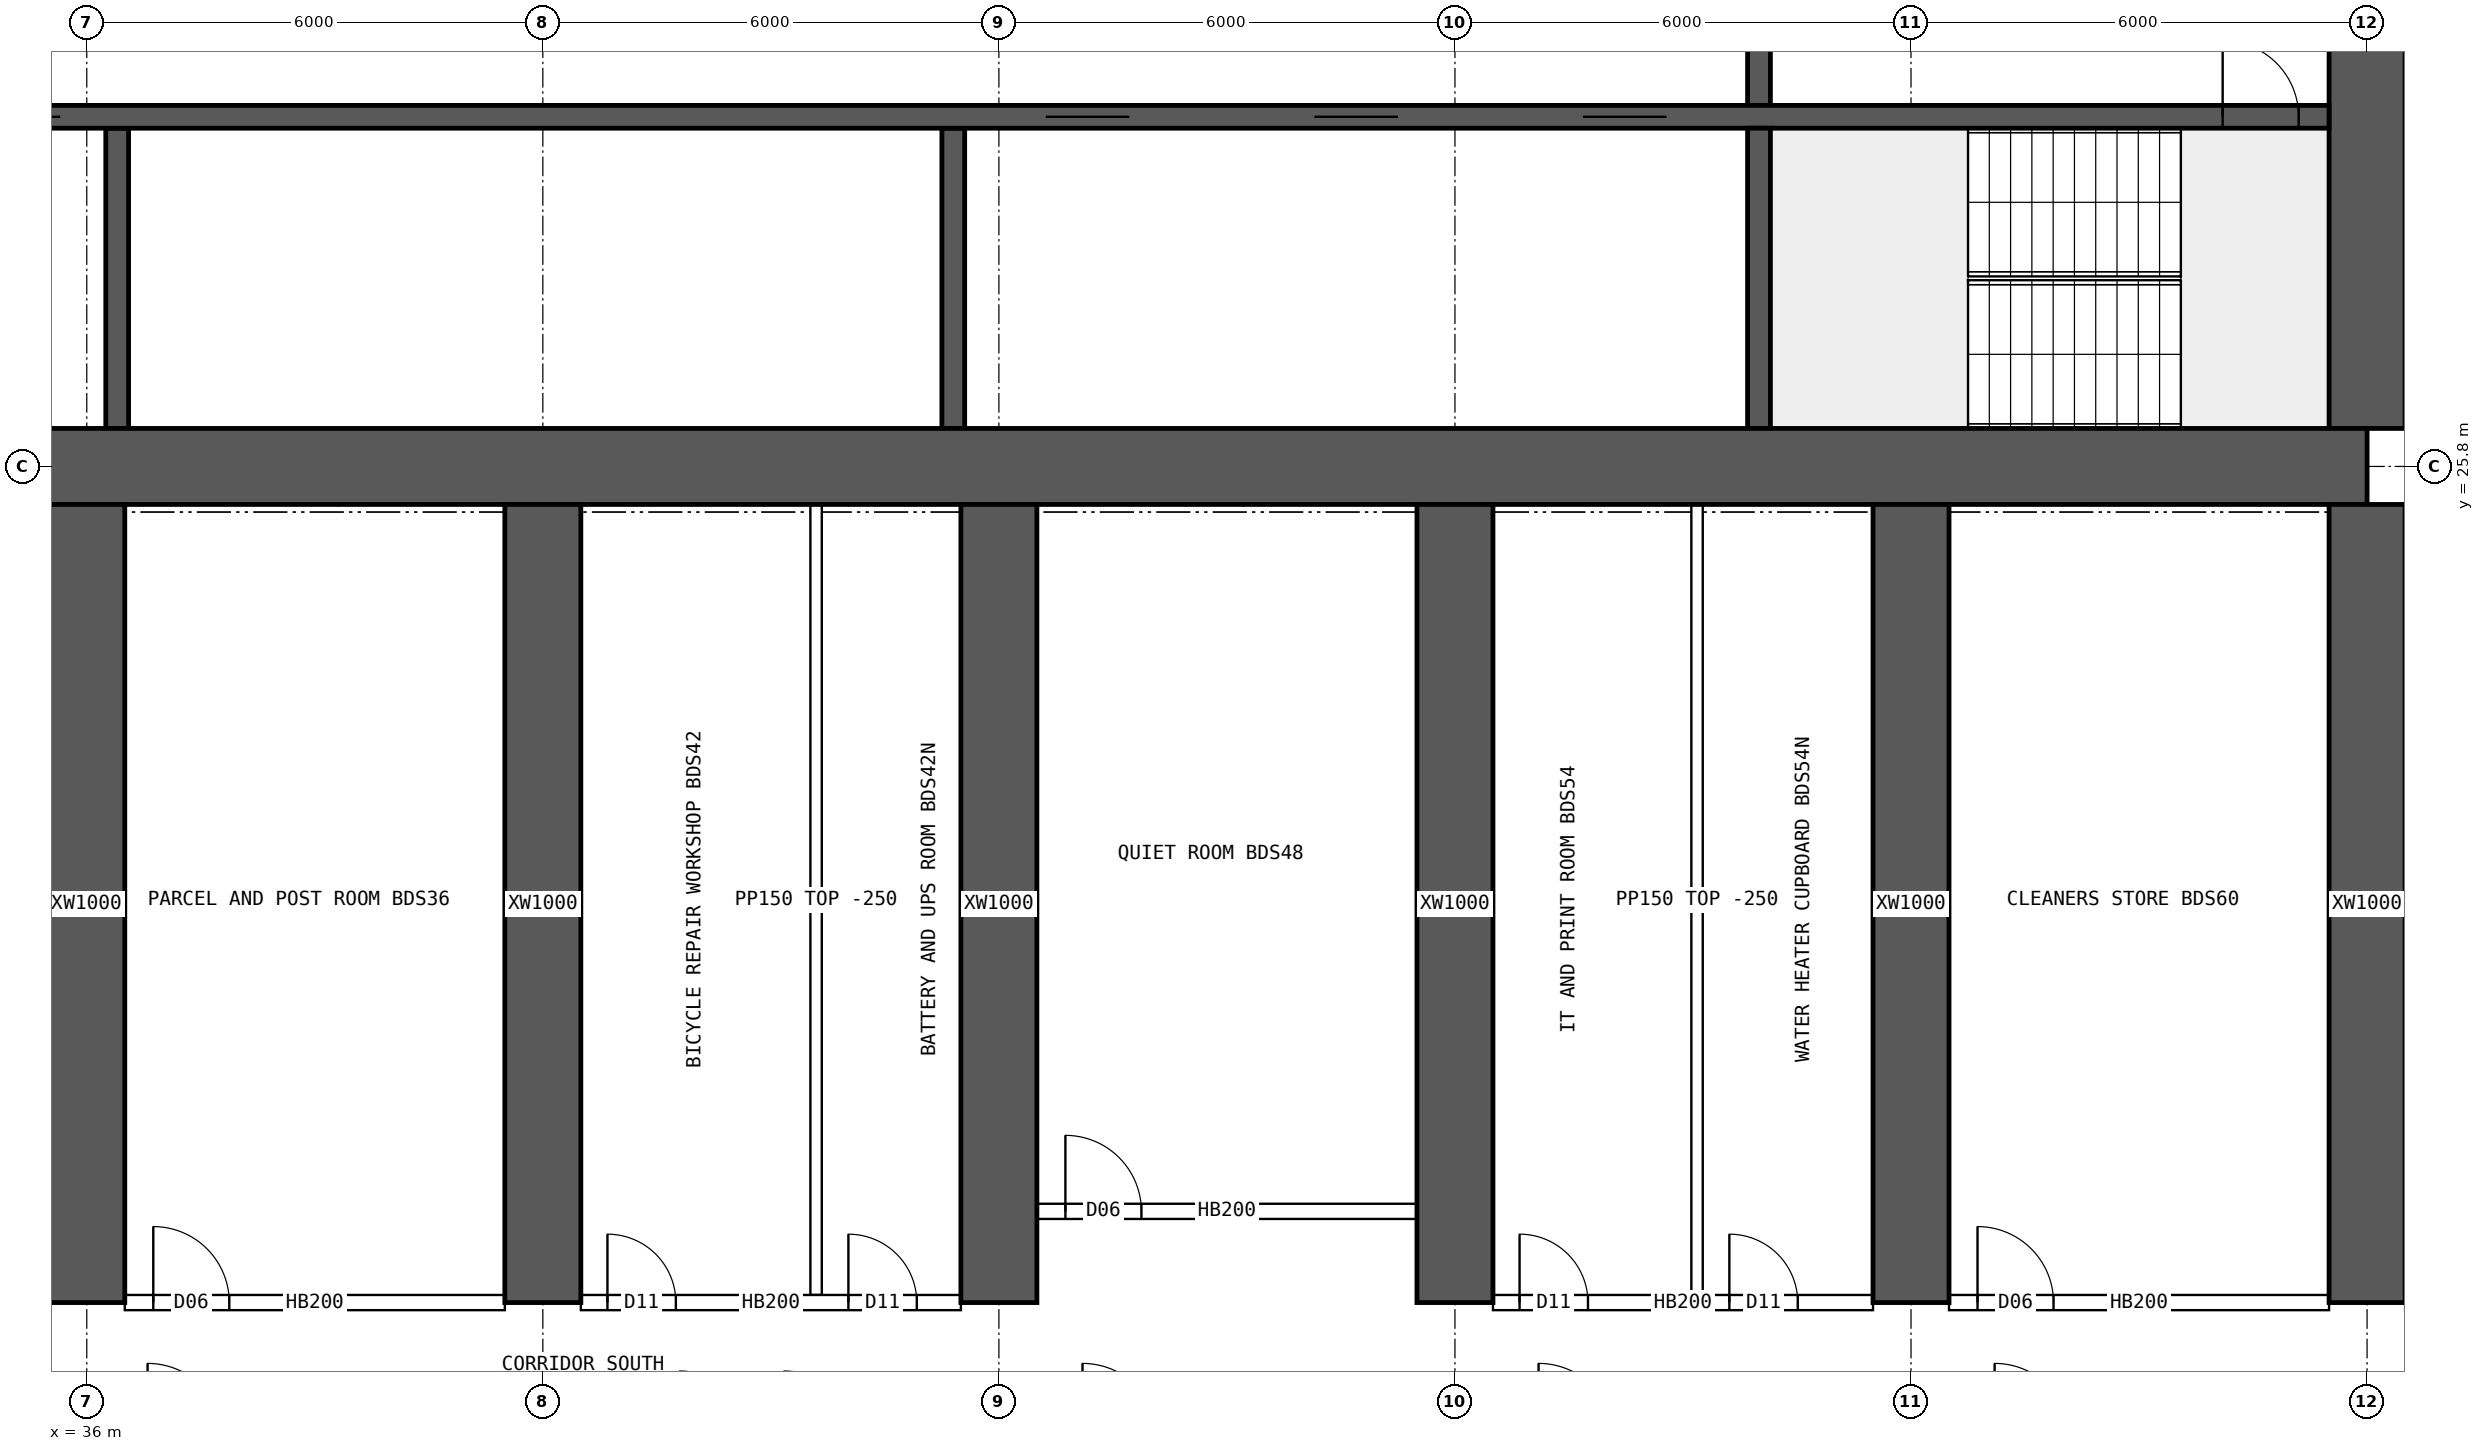
"""IFC4 building model, lengths in metres.
Left out: names, types, materials, properties, quantities, classifications, styles, units other than length and angle.
Written with IfcOpenShell. Run it as: python <this file> out.ifc"""

import sys

from ifc_helpers import new_model, si_unit, direction, frame, frame_2d, origin, place, context, subcontext, project, spatial, rectangle, extrude, element, fill, save


model = new_model("IFC4")
c1 = context("Model", 3, precision=1e-05, world=origin(), true_north=direction((0.0, 1.0)))
c2 = subcontext(c1, "Body", "Model", "MODEL_VIEW")
j1 = project(units=[si_unit("LENGTHUNIT", "METRE"), si_unit("PLANEANGLEUNIT", "RADIAN")], contexts=[c1])
p1 = place(None, origin())
s1 = spatial("IfcSite", under=j1, at=p1, CompositionType="ELEMENT")
p2 = place(p1, origin())
s2 = spatial("IfcBuilding", under=s1, at=p2, CompositionType="ELEMENT")
p3 = place(p2, frame((0.0, 0.0, 61.45)))
s3 = spatial("IfcBuildingStorey", under=s2, at=p3, CompositionType="ELEMENT", Elevation=61.45)
p4 = place(p3, frame((18.0, 25.8, 0.0), z_axis=(0.0, 0.0, 1.0), x_axis=(1.0, 0.0, 0.0)))
e1 = element("IfcWall", 1, at=p4, inside=s3, PredefinedType="SHEAR", context=c2, shape_type="SweptSolid", body=[
    extrude(rectangle(XDim=48.0, YDim=1.0, at=frame_2d((24.0, 0.0))), origin(), (0.0, 0.0, 1.0), 3.75),
])
p5 = place(p3, frame((66.0, 26.3, 0.0), z_axis=(0.0, 0.0, 1.0), x_axis=(0.0, 1.0, 0.0)))
e2 = element("IfcWall", 2, at=p5, inside=s3, PredefinedType="SHEAR", context=c2, shape_type="SweptSolid", body=[
    extrude(rectangle(XDim=11.4, YDim=1.0, at=frame_2d((5.7, 0.0))), origin(), (0.0, 0.0, 1.0), 3.75),
])
p6 = place(p5, frame((5.0, 0.0, 0.0)))
e3 = element("IfcOpeningElement", 3, at=p6, cuts=e2, PredefinedType="OPENING", context=c2, shape_type="SweptSolid", body=[
    extrude(rectangle(XDim=1.2, YDim=2.1, at=frame_2d((0.6, 1.05))), frame((0.0, 0.51, 0.0), z_axis=(0.0, -1.0, 0.0), x_axis=(1.0, 0.0, 0.0)), (0.0, 0.0, 1.0), 1.02),
])
p7 = place(p3, frame((18.5, 30.4, 0.0), z_axis=(0.0, 0.0, 1.0), x_axis=(1.0, 0.0, 0.0)))
e4 = element("IfcWall", 4, at=p7, inside=s3, PredefinedType="SHEAR", context=c2, shape_type="SweptSolid", body=[
    extrude(rectangle(XDim=47.0, YDim=0.3, at=frame_2d((23.5, 0.0))), origin(), (0.0, 0.0, 1.0), 3.75),
])
p8 = place(p7, frame((0.4, 0.0, 0.0)))
e5 = element("IfcOpeningElement", 5, at=p8, cuts=e4, PredefinedType="OPENING", context=c2, shape_type="SweptSolid", body=[
    extrude(rectangle(XDim=1.0, YDim=2.1, at=frame_2d((0.5, 1.05))), frame((0.0, 0.16, 0.0), z_axis=(0.0, -1.0, 0.0), x_axis=(1.0, 0.0, 0.0)), (0.0, 0.0, 1.0), 0.32),
])
p9 = place(p7, frame((45.6, 0.0, 0.0)))
e6 = element("IfcOpeningElement", 6, at=p9, cuts=e4, PredefinedType="OPENING", context=c2, shape_type="SweptSolid", body=[
    extrude(rectangle(XDim=1.0, YDim=2.1, at=frame_2d((0.5, 1.05))), frame((0.0, 0.16, 0.0), z_axis=(0.0, -1.0, 0.0), x_axis=(1.0, 0.0, 0.0)), (0.0, 0.0, 1.0), 0.32),
])
p10 = place(p7, frame((8.25, 0.0, 0.0)))
e7 = element("IfcOpeningElement", 7, at=p10, cuts=e4, PredefinedType="OPENING", context=c2, shape_type="SweptSolid", body=[
    extrude(rectangle(XDim=1.1, YDim=2.1, at=frame_2d((0.55, 1.05))), frame((0.0, 0.16, 0.0), z_axis=(0.0, -1.0, 0.0), x_axis=(1.0, 0.0, 0.0)), (0.0, 0.0, 1.0), 0.32),
])
p11 = place(p7, frame((10.85, 0.0, 0.0)))
e8 = element("IfcOpeningElement", 8, at=p11, cuts=e4, PredefinedType="OPENING", context=c2, shape_type="SweptSolid", body=[
    extrude(rectangle(XDim=1.1, YDim=2.1, at=frame_2d((0.55, 1.05))), frame((0.0, 0.16, 0.0), z_axis=(0.0, -1.0, 0.0), x_axis=(1.0, 0.0, 0.0)), (0.0, 0.0, 1.0), 0.32),
])
p12 = place(p7, frame((13.45, 0.0, 0.0)))
e9 = element("IfcOpeningElement", 9, at=p12, cuts=e4, PredefinedType="OPENING", context=c2, shape_type="SweptSolid", body=[
    extrude(rectangle(XDim=1.1, YDim=2.1, at=frame_2d((0.55, 1.05))), frame((0.0, 0.16, 0.0), z_axis=(0.0, -1.0, 0.0), x_axis=(1.0, 0.0, 0.0)), (0.0, 0.0, 1.0), 0.32),
])
p13 = place(p7, frame((16.05, 0.0, 0.0)))
e10 = element("IfcOpeningElement", 10, at=p13, cuts=e4, PredefinedType="OPENING", context=c2, shape_type="SweptSolid", body=[
    extrude(rectangle(XDim=1.1, YDim=2.1, at=frame_2d((0.55, 1.05))), frame((0.0, 0.16, 0.0), z_axis=(0.0, -1.0, 0.0), x_axis=(1.0, 0.0, 0.0)), (0.0, 0.0, 1.0), 0.32),
])
p14 = place(p7, frame((30.117, 0.0, 0.0)))
e11 = element("IfcOpeningElement", 11, at=p14, cuts=e4, PredefinedType="OPENING", context=c2, shape_type="SweptSolid", body=[
    extrude(rectangle(XDim=1.1, YDim=2.1, at=frame_2d((0.55, 1.05))), frame((0.0, 0.16, 0.0), z_axis=(0.0, -1.0, 0.0), x_axis=(1.0, 0.0, 0.0)), (0.0, 0.0, 1.0), 0.32),
])
p15 = place(p7, frame((33.65, 0.0, 0.0)))
e12 = element("IfcOpeningElement", 12, at=p15, cuts=e4, PredefinedType="OPENING", context=c2, shape_type="SweptSolid", body=[
    extrude(rectangle(XDim=1.1, YDim=2.1, at=frame_2d((0.55, 1.05))), frame((0.0, 0.16, 0.0), z_axis=(0.0, -1.0, 0.0), x_axis=(1.0, 0.0, 0.0)), (0.0, 0.0, 1.0), 0.32),
])
p16 = place(p7, frame((37.183, 0.0, 0.0)))
e13 = element("IfcOpeningElement", 13, at=p16, cuts=e4, PredefinedType="OPENING", context=c2, shape_type="SweptSolid", body=[
    extrude(rectangle(XDim=1.1, YDim=2.1, at=frame_2d((0.55, 1.05))), frame((0.0, 0.16, 0.0), z_axis=(0.0, -1.0, 0.0), x_axis=(1.0, 0.0, 0.0)), (0.0, 0.0, 1.0), 0.32),
])
p17 = place(p3, frame((58.0, 26.3, 0.0), z_axis=(0.0, 0.0, 1.0), x_axis=(0.0, 1.0, 0.0)))
e14 = element("IfcWall", 14, at=p17, inside=s3, PredefinedType="SHEAR", context=c2, shape_type="SweptSolid", body=[
    extrude(rectangle(XDim=3.95, YDim=0.3, at=frame_2d((1.975, 0.0))), origin(), (0.0, 0.0, 1.0), 3.75),
])
p18 = place(p3, frame((58.0, 30.55, 0.0), z_axis=(0.0, 0.0, 1.0), x_axis=(0.0, 1.0, 0.0)))
e15 = element("IfcWall", 15, at=p18, inside=s3, PredefinedType="SHEAR", context=c2, shape_type="SweptSolid", body=[
    extrude(rectangle(XDim=3.9, YDim=0.3, at=frame_2d((1.95, 0.0))), origin(), (0.0, 0.0, 1.0), 3.75),
])
p19 = place(p18, frame((1.4, 0.0, 0.0)))
e16 = element("IfcOpeningElement", 16, at=p19, cuts=e15, PredefinedType="OPENING", context=c2, shape_type="SweptSolid", body=[
    extrude(rectangle(XDim=1.2, YDim=2.1, at=frame_2d((0.6, 1.05))), frame((0.0, 0.16, 0.0), z_axis=(0.0, -1.0, 0.0), x_axis=(1.0, 0.0, 0.0)), (0.0, 0.0, 1.0), 0.32),
])
for number, where, z_axis, x_axis in (
    (17, (36.4, 26.3, 0.0), (0.0, 0.0, 1.0), (0.0, 1.0, 0.0)),
    (18, (47.4, 26.3, 0.0), (0.0, 0.0, 1.0), (0.0, 1.0, 0.0)),
):
    element("IfcWall", number, at=place(p3, frame(where, z_axis=z_axis, x_axis=x_axis)), inside=s3, PredefinedType="SHEAR", context=c2, shape_type="SweptSolid", body=[
        extrude(rectangle(XDim=3.95, YDim=0.3, at=frame_2d((1.975, 0.0))), origin(), (0.0, 0.0, 1.0), 3.75),
    ])
for number, where, z_axis, x_axis in (
    (19, (36.0, 14.8, 0.0), (0.0, 0.0, 1.0), (0.0, 1.0, 0.0)),
    (20, (42.0, 14.8, 0.0), (0.0, 0.0, 1.0), (0.0, 1.0, 0.0)),
    (21, (48.0, 14.8, 0.0), (0.0, 0.0, 1.0), (0.0, 1.0, 0.0)),
    (22, (54.0, 14.8, 0.0), (0.0, 0.0, 1.0), (0.0, 1.0, 0.0)),
    (23, (60.0, 14.8, 0.0), (0.0, 0.0, 1.0), (0.0, 1.0, 0.0)),
    (24, (66.0, 14.8, 0.0), (0.0, 0.0, 1.0), (0.0, 1.0, 0.0)),
):
    element("IfcWall", number, at=place(p3, frame(where, z_axis=z_axis, x_axis=x_axis)), inside=s3, PredefinedType="SHEAR", context=c2, shape_type="SweptSolid", body=[
        extrude(rectangle(XDim=10.5, YDim=1.0, at=frame_2d((5.25, 0.0))), origin(), (0.0, 0.0, 1.0), 3.75),
    ])
p20 = place(p3, frame((36.5, 14.8, 0.0), z_axis=(0.0, 0.0, 1.0), x_axis=(1.0, 0.0, 0.0)))
e25 = element("IfcWall", 25, at=p20, inside=s3, PredefinedType="SOLIDWALL", context=c2, shape_type="SweptSolid", body=[
    extrude(rectangle(XDim=5.0, YDim=0.2, at=frame_2d((2.5, 0.0))), origin(), (0.0, 0.0, 1.0), 3.5),
])
p21 = place(p20, frame((0.375, 0.0, 0.0)))
e26 = element("IfcOpeningElement", 26, at=p21, cuts=e25, PredefinedType="OPENING", context=c2, shape_type="SweptSolid", body=[
    extrude(rectangle(XDim=1.0, YDim=2.1, at=frame_2d((0.5, 1.05))), frame((0.0, 0.11, 0.0), z_axis=(0.0, -1.0, 0.0), x_axis=(1.0, 0.0, 0.0)), (0.0, 0.0, 1.0), 0.22),
])
p22 = place(p3, frame((42.5, 14.8, 0.0), z_axis=(0.0, 0.0, 1.0), x_axis=(1.0, 0.0, 0.0)))
e27 = element("IfcWall", 27, at=p22, inside=s3, PredefinedType="SOLIDWALL", context=c2, shape_type="SweptSolid", body=[
    extrude(rectangle(XDim=5.0, YDim=0.2, at=frame_2d((2.5, 0.0))), origin(), (0.0, 0.0, 1.0), 3.5),
])
p23 = place(p22, frame((0.35, 0.0, 0.0)))
e28 = element("IfcOpeningElement", 28, at=p23, cuts=e27, PredefinedType="OPENING", context=c2, shape_type="SweptSolid", body=[
    extrude(rectangle(XDim=0.9, YDim=2.1, at=frame_2d((0.45, 1.05))), frame((0.0, 0.11, 0.0), z_axis=(0.0, -1.0, 0.0), x_axis=(1.0, 0.0, 0.0)), (0.0, 0.0, 1.0), 0.22),
])
p24 = place(p22, frame((3.52, 0.0, 0.0)))
e29 = element("IfcOpeningElement", 29, at=p24, cuts=e27, PredefinedType="OPENING", context=c2, shape_type="SweptSolid", body=[
    extrude(rectangle(XDim=0.9, YDim=2.1, at=frame_2d((0.45, 1.05))), frame((0.0, 0.11, 0.0), z_axis=(0.0, -1.0, 0.0), x_axis=(1.0, 0.0, 0.0)), (0.0, 0.0, 1.0), 0.22),
])
p25 = place(p3, frame((54.5, 14.8, 0.0), z_axis=(0.0, 0.0, 1.0), x_axis=(1.0, 0.0, 0.0)))
e30 = element("IfcWall", 30, at=p25, inside=s3, PredefinedType="SOLIDWALL", context=c2, shape_type="SweptSolid", body=[
    extrude(rectangle(XDim=5.0, YDim=0.2, at=frame_2d((2.5, 0.0))), origin(), (0.0, 0.0, 1.0), 3.5),
])
p26 = place(p25, frame((0.35, 0.0, 0.0)))
e31 = element("IfcOpeningElement", 31, at=p26, cuts=e30, PredefinedType="OPENING", context=c2, shape_type="SweptSolid", body=[
    extrude(rectangle(XDim=0.9, YDim=2.1, at=frame_2d((0.45, 1.05))), frame((0.0, 0.11, 0.0), z_axis=(0.0, -1.0, 0.0), x_axis=(1.0, 0.0, 0.0)), (0.0, 0.0, 1.0), 0.22),
])
p27 = place(p25, frame((3.11, 0.0, 0.0)))
e32 = element("IfcOpeningElement", 32, at=p27, cuts=e30, PredefinedType="OPENING", context=c2, shape_type="SweptSolid", body=[
    extrude(rectangle(XDim=0.9, YDim=2.1, at=frame_2d((0.45, 1.05))), frame((0.0, 0.11, 0.0), z_axis=(0.0, -1.0, 0.0), x_axis=(1.0, 0.0, 0.0)), (0.0, 0.0, 1.0), 0.22),
])
p28 = place(p3, frame((60.5, 14.8, 0.0), z_axis=(0.0, 0.0, 1.0), x_axis=(1.0, 0.0, 0.0)))
e33 = element("IfcWall", 33, at=p28, inside=s3, PredefinedType="SOLIDWALL", context=c2, shape_type="SweptSolid", body=[
    extrude(rectangle(XDim=5.0, YDim=0.2, at=frame_2d((2.5, 0.0))), origin(), (0.0, 0.0, 1.0), 3.5),
])
p29 = place(p28, frame((0.375, 0.0, 0.0)))
e34 = element("IfcOpeningElement", 34, at=p29, cuts=e33, PredefinedType="OPENING", context=c2, shape_type="SweptSolid", body=[
    extrude(rectangle(XDim=1.0, YDim=2.1, at=frame_2d((0.5, 1.05))), frame((0.0, 0.11, 0.0), z_axis=(0.0, -1.0, 0.0), x_axis=(1.0, 0.0, 0.0)), (0.0, 0.0, 1.0), 0.22),
])
p30 = place(p3, frame((45.595, 14.9, 0.0), z_axis=(0.0, 0.0, 1.0), x_axis=(0.0, 1.0, 0.0)))
e35 = element("IfcWall", 35, at=p30, inside=s3, PredefinedType="PARTITIONING", context=c2, shape_type="SweptSolid", body=[
    extrude(rectangle(XDim=10.4, YDim=0.15, at=frame_2d((5.2, 0.0))), origin(), (0.0, 0.0, 1.0), 3.5),
])
p31 = place(p3, frame((48.5, 16.0, 0.0), z_axis=(0.0, 0.0, 1.0), x_axis=(1.0, 0.0, 0.0)))
e36 = element("IfcWall", 36, at=p31, inside=s3, PredefinedType="SOLIDWALL", context=c2, shape_type="SweptSolid", body=[
    extrude(rectangle(XDim=5.0, YDim=0.2, at=frame_2d((2.5, 0.0))), origin(), (0.0, 0.0, 1.0), 3.5),
])
p32 = place(p31, frame((0.375, 0.0, 0.0)))
e37 = element("IfcOpeningElement", 37, at=p32, cuts=e36, PredefinedType="OPENING", context=c2, shape_type="SweptSolid", body=[
    extrude(rectangle(XDim=1.0, YDim=2.1, at=frame_2d((0.5, 1.05))), frame((0.0, 0.11, 0.0), z_axis=(0.0, -1.0, 0.0), x_axis=(1.0, 0.0, 0.0)), (0.0, 0.0, 1.0), 0.22),
])
p33 = place(p3, frame((57.185, 14.9, 0.0), z_axis=(0.0, 0.0, 1.0), x_axis=(0.0, 1.0, 0.0)))
e38 = element("IfcWall", 38, at=p33, inside=s3, PredefinedType="PARTITIONING", context=c2, shape_type="SweptSolid", body=[
    extrude(rectangle(XDim=10.4, YDim=0.15, at=frame_2d((5.2, 0.0))), origin(), (0.0, 0.0, 1.0), 3.5),
])
p34 = place(p9, origin())
e39 = element("IfcDoor", 39, at=p34, inside=s3, OperationType="SINGLE_SWING_LEFT", PredefinedType="DOOR", context=c2, shape_type="SweptSolid", body=[
    extrude(rectangle(XDim=1.0, YDim=2.1, at=frame_2d((0.5, 1.05))), frame((0.0, 0.025, 0.0), z_axis=(0.0, -1.0, 0.0), x_axis=(1.0, 0.0, 0.0)), (0.0, 0.0, 1.0), 0.05),
])
fill(e6, e39)
p35 = place(p13, origin())
e40 = element("IfcDoor", 40, at=p35, inside=s3, OperationType="DOUBLE_DOOR_SLIDING", PredefinedType="DOOR", context=c2, shape_type="SweptSolid", body=[
    extrude(rectangle(XDim=1.1, YDim=2.1, at=frame_2d((0.55, 1.05))), frame((0.0, 0.025, 0.0), z_axis=(0.0, -1.0, 0.0), x_axis=(1.0, 0.0, 0.0)), (0.0, 0.0, 1.0), 0.05),
])
fill(e10, e40)
p36 = place(p14, origin())
e41 = element("IfcDoor", 41, at=p36, inside=s3, OperationType="DOUBLE_DOOR_SLIDING", PredefinedType="DOOR", context=c2, shape_type="SweptSolid", body=[
    extrude(rectangle(XDim=1.1, YDim=2.1, at=frame_2d((0.55, 1.05))), frame((0.0, 0.025, 0.0), z_axis=(0.0, -1.0, 0.0), x_axis=(1.0, 0.0, 0.0)), (0.0, 0.0, 1.0), 0.05),
])
fill(e11, e41)
p37 = place(p15, origin())
e42 = element("IfcDoor", 42, at=p37, inside=s3, OperationType="DOUBLE_DOOR_SLIDING", PredefinedType="DOOR", context=c2, shape_type="SweptSolid", body=[
    extrude(rectangle(XDim=1.1, YDim=2.1, at=frame_2d((0.55, 1.05))), frame((0.0, 0.025, 0.0), z_axis=(0.0, -1.0, 0.0), x_axis=(1.0, 0.0, 0.0)), (0.0, 0.0, 1.0), 0.05),
])
fill(e12, e42)
p38 = place(p16, origin())
e43 = element("IfcDoor", 43, at=p38, inside=s3, OperationType="DOUBLE_DOOR_SLIDING", PredefinedType="DOOR", context=c2, shape_type="SweptSolid", body=[
    extrude(rectangle(XDim=1.1, YDim=2.1, at=frame_2d((0.55, 1.05))), frame((0.0, 0.025, 0.0), z_axis=(0.0, -1.0, 0.0), x_axis=(1.0, 0.0, 0.0)), (0.0, 0.0, 1.0), 0.05),
])
fill(e13, e43)
p39 = place(p21, origin())
e44 = element("IfcDoor", 44, at=p39, inside=s3, OperationType="SINGLE_SWING_LEFT", PredefinedType="DOOR", context=c2, shape_type="SweptSolid", body=[
    extrude(rectangle(XDim=1.0, YDim=2.1, at=frame_2d((0.5, 1.05))), frame((0.0, 0.025, 0.0), z_axis=(0.0, -1.0, 0.0), x_axis=(1.0, 0.0, 0.0)), (0.0, 0.0, 1.0), 0.05),
])
fill(e26, e44)
p40 = place(p23, origin())
e45 = element("IfcDoor", 45, at=p40, inside=s3, OperationType="SINGLE_SWING_LEFT", PredefinedType="DOOR", context=c2, shape_type="SweptSolid", body=[
    extrude(rectangle(XDim=0.9, YDim=2.1, at=frame_2d((0.45, 1.05))), frame((0.0, 0.025, 0.0), z_axis=(0.0, -1.0, 0.0), x_axis=(1.0, 0.0, 0.0)), (0.0, 0.0, 1.0), 0.05),
])
fill(e28, e45)
p41 = place(p24, origin())
e46 = element("IfcDoor", 46, at=p41, inside=s3, OperationType="SINGLE_SWING_LEFT", PredefinedType="DOOR", context=c2, shape_type="SweptSolid", body=[
    extrude(rectangle(XDim=0.9, YDim=2.1, at=frame_2d((0.45, 1.05))), frame((0.0, 0.025, 0.0), z_axis=(0.0, -1.0, 0.0), x_axis=(1.0, 0.0, 0.0)), (0.0, 0.0, 1.0), 0.05),
])
fill(e29, e46)
p42 = place(p32, origin())
e47 = element("IfcDoor", 47, at=p42, inside=s3, OperationType="SINGLE_SWING_LEFT", PredefinedType="DOOR", context=c2, shape_type="SweptSolid", body=[
    extrude(rectangle(XDim=1.0, YDim=2.1, at=frame_2d((0.5, 1.05))), frame((0.0, 0.025, 0.0), z_axis=(0.0, -1.0, 0.0), x_axis=(1.0, 0.0, 0.0)), (0.0, 0.0, 1.0), 0.05),
])
fill(e37, e47)
p43 = place(p26, origin())
e48 = element("IfcDoor", 48, at=p43, inside=s3, OperationType="SINGLE_SWING_LEFT", PredefinedType="DOOR", context=c2, shape_type="SweptSolid", body=[
    extrude(rectangle(XDim=0.9, YDim=2.1, at=frame_2d((0.45, 1.05))), frame((0.0, 0.025, 0.0), z_axis=(0.0, -1.0, 0.0), x_axis=(1.0, 0.0, 0.0)), (0.0, 0.0, 1.0), 0.05),
])
fill(e31, e48)
p44 = place(p27, origin())
e49 = element("IfcDoor", 49, at=p44, inside=s3, OperationType="SINGLE_SWING_LEFT", PredefinedType="DOOR", context=c2, shape_type="SweptSolid", body=[
    extrude(rectangle(XDim=0.9, YDim=2.1, at=frame_2d((0.45, 1.05))), frame((0.0, 0.025, 0.0), z_axis=(0.0, -1.0, 0.0), x_axis=(1.0, 0.0, 0.0)), (0.0, 0.0, 1.0), 0.05),
])
fill(e32, e49)
p45 = place(p29, origin())
e50 = element("IfcDoor", 50, at=p45, inside=s3, OperationType="SINGLE_SWING_LEFT", PredefinedType="DOOR", context=c2, shape_type="SweptSolid", body=[
    extrude(rectangle(XDim=1.0, YDim=2.1, at=frame_2d((0.5, 1.05))), frame((0.0, 0.025, 0.0), z_axis=(0.0, -1.0, 0.0), x_axis=(1.0, 0.0, 0.0)), (0.0, 0.0, 1.0), 0.05),
])
fill(e34, e50)
save(model, sys.argv[1])
